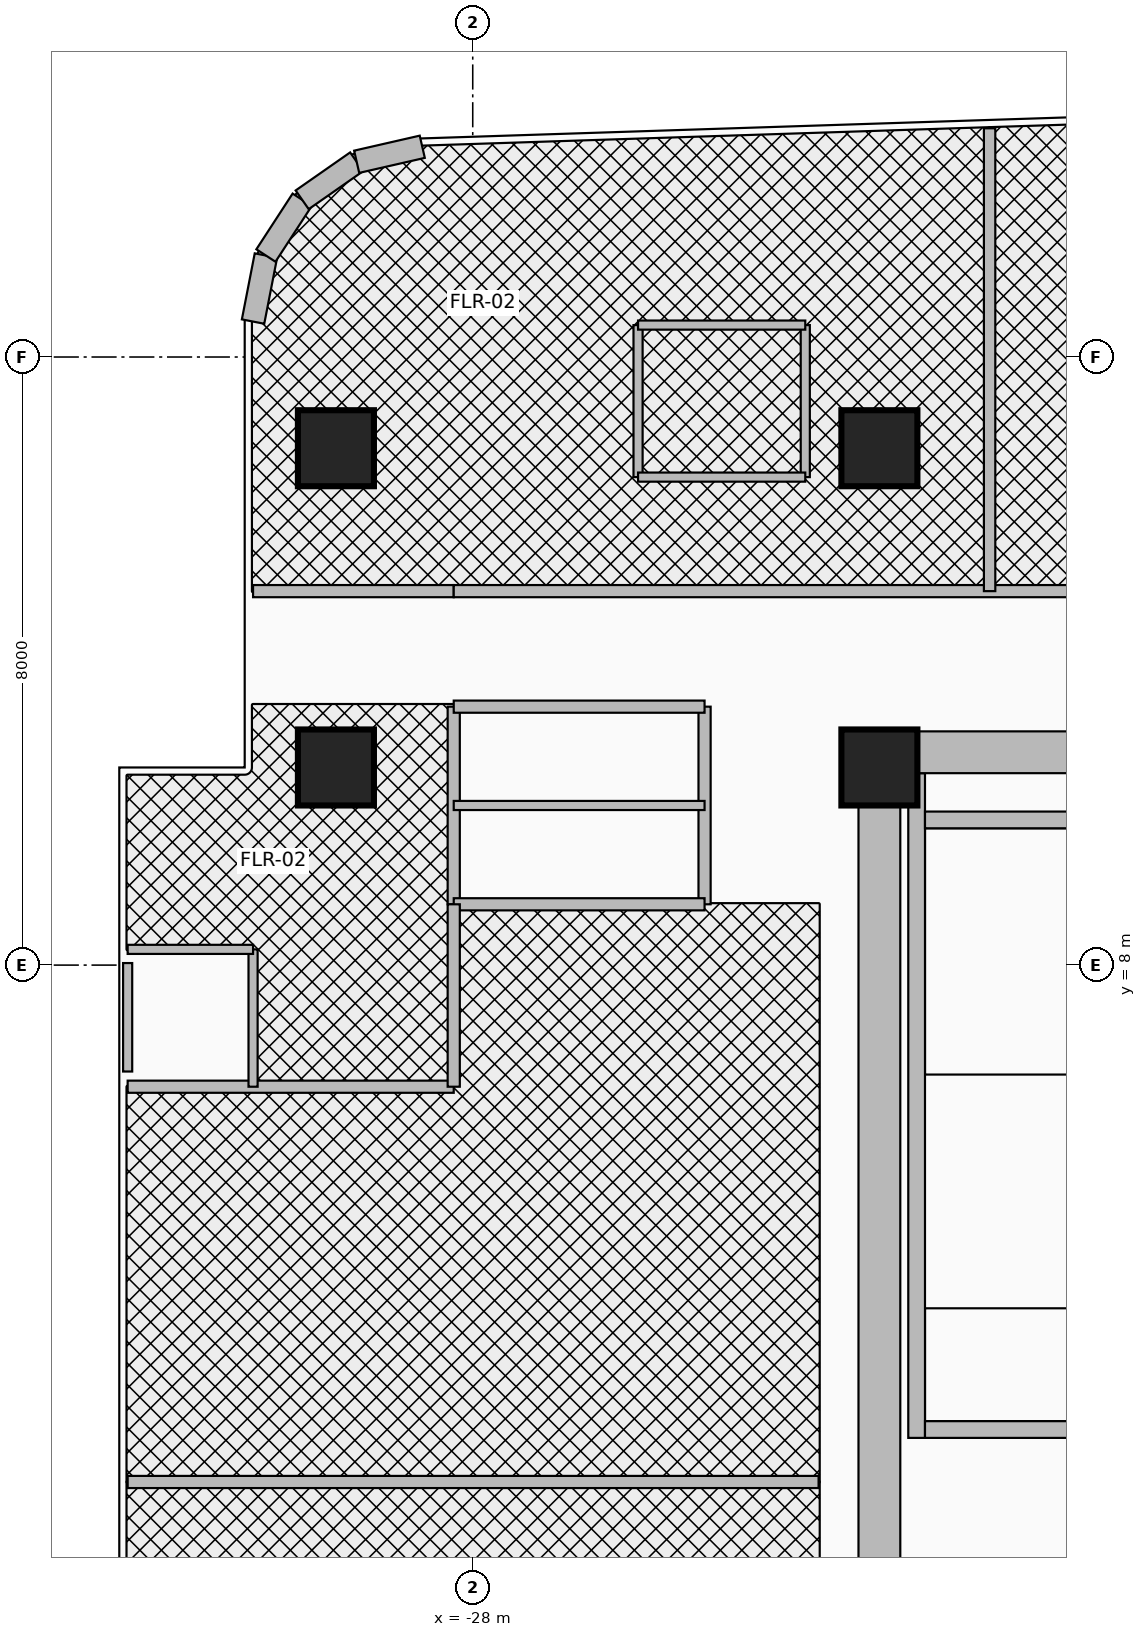
"""IFC4 building model, lengths in metres.
Left out: names, types, materials, properties, quantities, classifications, styles, units other than length and angle.
Written with IfcOpenShell. Run it as: python <this file> out.ifc"""

import sys

from ifc_helpers import new_model, si_unit, direction, frame, frame_2d, origin, origin_2d, place, context, subcontext, project, spatial, rectangle, extrude, source, transform, mapped, element, fill, save


model = new_model("IFC4")
c1 = context("Model", 3, precision=1e-05, world=origin(), true_north=direction((0.0, 1.0)))
c2 = subcontext(c1, "Body", "Model", "MODEL_VIEW")
j1 = project(units=[si_unit("LENGTHUNIT", "METRE"), si_unit("PLANEANGLEUNIT", "RADIAN")], contexts=[c1])
p1 = place(None, origin())
s1 = spatial("IfcSite", under=j1, at=p1, CompositionType="ELEMENT")
p2 = place(p1, origin())
s2 = spatial("IfcBuilding", under=s1, at=p2, CompositionType="ELEMENT")
p3 = place(p2, frame((0.0, 0.0, 172.3)))
s3 = spatial("IfcBuildingStorey", under=s2, at=p3, CompositionType="ELEMENT", Elevation=172.3)
p4 = place(p3, frame((-22.16, 1.78, 0.0), z_axis=(0.0, 0.0, 1.0), x_axis=(0.0, 1.0, 0.0)))
e1 = element("IfcWall", 1, at=p4, inside=s3, PredefinedType="SHEAR", context=c2, shape_type="SweptSolid", body=[
    extrude(rectangle(XDim=8.745, YDim=0.22, at=frame_2d((4.373, 0.0))), origin(), (0.0, 0.0, 1.0), 3.93),
])
p5 = place(p3, frame((-22.05, 1.89, 0.0), z_axis=(0.0, 0.0, 1.0), x_axis=(1.0, 0.0, 0.0)))
e2 = element("IfcWall", 2, at=p5, inside=s3, PredefinedType="SHEAR", context=c2, shape_type="SweptSolid", body=[
    extrude(rectangle(XDim=3.11, YDim=0.22, at=frame_2d((1.555, 0.0))), origin(), (0.0, 0.0, 1.0), 3.93),
])
p6 = place(p5, frame((1.0, 0.0, 0.0)))
e3 = element("IfcOpeningElement", 3, at=p6, cuts=e2, PredefinedType="OPENING", context=c2, shape_type="SweptSolid", body=[
    extrude(rectangle(XDim=1.1, YDim=2.15, at=frame_2d((0.55, 1.075))), frame((0.0, 0.125, 0.0), z_axis=(0.0, -1.0, 0.0), x_axis=(1.0, 0.0, 0.0)), (0.0, 0.0, 1.0), 0.25),
])
p7 = place(p3, frame((-22.05, 9.91, 0.0), z_axis=(0.0, 0.0, 1.0), x_axis=(1.0, 0.0, 0.0)))
e4 = element("IfcWall", 4, at=p7, inside=s3, PredefinedType="SHEAR", context=c2, shape_type="SweptSolid", body=[
    extrude(rectangle(XDim=3.11, YDim=0.22, at=frame_2d((1.555, 0.0))), origin(), (0.0, 0.0, 1.0), 3.93),
])
p8 = place(p3, frame((-22.65, -11.075, 0.0), z_axis=(0.0, 0.0, 1.0), x_axis=(0.0, 1.0, 0.0)))
e5 = element("IfcWall", 5, at=p8, inside=s3, PredefinedType="SHEAR", context=c2, shape_type="SweptSolid", body=[
    extrude(rectangle(XDim=22.15, YDim=0.55, at=frame_2d((11.075, 0.0))), origin(), (0.0, 0.0, 1.0), 3.93),
])
p9 = place(p3, frame((-22.65, 10.8, 0.0), z_axis=(0.0, 0.0, 1.0), x_axis=(1.0, 0.0, 0.0)))
e6 = element("IfcWall", 6, at=p9, inside=s3, PredefinedType="SHEAR", context=c2, shape_type="SweptSolid", body=[
    extrude(rectangle(XDim=10.25, YDim=0.55, at=frame_2d((5.125, 0.0))), origin(), (0.0, 0.0, 1.0), 3.93),
])
m1 = source(origin(), c2, "Body", "SweptSolid", [
    extrude(rectangle(XDim=1.0, YDim=1.0, at=origin_2d()), origin(), (0.0, 0.0, 1.0), 4.25),
])
for number, where, z_axis, x_axis in (
    (7, (-29.8, 10.6, 0.0), (0.0, 0.0, 1.0), (1.0, 0.0, 0.0)),
    (8, (-22.65, 10.6, 0.0), (0.0, 0.0, 1.0), (1.0, 0.0, 0.0)),
    (9, (-29.8, 14.8, 0.0), (0.0, 0.0, 1.0), (1.0, 0.0, 0.0)),
    (10, (-22.65, 14.8, 0.0), (0.0, 0.0, 1.0), (1.0, 0.0, 0.0)),
):
    element("IfcColumn", number, at=place(p3, frame(where, z_axis=z_axis, x_axis=x_axis)), inside=s3, PredefinedType="COLUMN", context=c2, shape_type="MappedRepresentation", body=[
        mapped(m1, transform((0.0, 0.0, 0.0), x_axis=(1.0, 0.0, 0.0), y_axis=(0.0, 1.0, 0.0), z_axis=(0.0, 0.0, 1.0), scale=1.0)),
    ])
p10 = place(p3, frame((-30.89, 16.466, 0.0), z_axis=(0.0, 0.0, 1.0), x_axis=(0.191128020887, 0.981565117367, 0.0)))
e11 = element("IfcWall", 11, at=p10, inside=s3, PredefinedType="SOLIDWALL", context=c2, shape_type="SweptSolid", body=[
    extrude(rectangle(XDim=0.885, YDim=0.3, at=frame_2d((0.443, 0.0))), origin(), (0.0, 0.0, 1.0), 3.93),
])
p11 = place(p3, frame((-30.721, 17.335, 0.0), z_axis=(0.0, 0.0, 1.0), x_axis=(0.545322000684, 0.838226649284, 0.0)))
e12 = element("IfcWall", 12, at=p11, inside=s3, PredefinedType="SOLIDWALL", context=c2, shape_type="SweptSolid", body=[
    extrude(rectangle(XDim=0.874, YDim=0.3, at=frame_2d((0.437, 0.0))), origin(), (0.0, 0.0, 1.0), 3.93),
])
p12 = place(p3, frame((-30.244, 18.068, 0.0), z_axis=(0.0, 0.0, 1.0), x_axis=(0.820005059444, 0.572356272339, 0.0)))
e13 = element("IfcWall", 13, at=p12, inside=s3, PredefinedType="SOLIDWALL", context=c2, shape_type="SweptSolid", body=[
    extrude(rectangle(XDim=0.875, YDim=0.3, at=frame_2d((0.437, 0.0))), origin(), (0.0, 0.0, 1.0), 3.93),
])
p13 = place(p3, frame((-29.527, 18.569, 0.0), z_axis=(0.0, 0.0, 1.0), x_axis=(0.974798570829, 0.223086858218, 0.0)))
e14 = element("IfcWall", 14, at=p13, inside=s3, PredefinedType="SOLIDWALL", context=c2, shape_type="SweptSolid", body=[
    extrude(rectangle(XDim=0.885, YDim=0.3, at=frame_2d((0.443, 0.0))), origin(), (0.0, 0.0, 1.0), 3.93),
])
p14 = place(p3, frame((-28.25, 8.8, 0.0), z_axis=(0.0, 0.0, 1.0), x_axis=(0.0, 1.0, 0.0)))
e15 = element("IfcWall", 15, at=p14, inside=s3, PredefinedType="PARTITIONING", context=c2, shape_type="SweptSolid", body=[
    extrude(rectangle(XDim=2.6, YDim=0.16, at=frame_2d((1.3, 0.0))), origin(), (0.0, 0.0, 1.0), 2.965),
])
p15 = place(p3, frame((-24.95, 8.8, 0.0), z_axis=(0.0, 0.0, 1.0), x_axis=(0.0, 1.0, 0.0)))
e16 = element("IfcWall", 16, at=p15, inside=s3, PredefinedType="PARTITIONING", context=c2, shape_type="SweptSolid", body=[
    extrude(rectangle(XDim=2.6, YDim=0.16, at=frame_2d((1.3, 0.0))), origin(), (0.0, 0.0, 1.0), 2.965),
])
p16 = place(p15, frame((0.3, 0.0, 0.0)))
e17 = element("IfcOpeningElement", 17, at=p16, cuts=e16, PredefinedType="OPENING", context=c2, shape_type="SweptSolid", body=[
    extrude(rectangle(XDim=0.85, YDim=2.1, at=frame_2d((0.425, 1.05))), frame((0.0, 0.095, 0.0), z_axis=(0.0, -1.0, 0.0), x_axis=(1.0, 0.0, 0.0)), (0.0, 0.0, 1.0), 0.19),
])
p17 = place(p15, frame((1.45, 0.0, 0.0)))
e18 = element("IfcOpeningElement", 18, at=p17, cuts=e16, PredefinedType="OPENING", context=c2, shape_type="SweptSolid", body=[
    extrude(rectangle(XDim=0.85, YDim=2.1, at=frame_2d((0.425, 1.05))), frame((0.0, 0.095, 0.0), z_axis=(0.0, -1.0, 0.0), x_axis=(1.0, 0.0, 0.0)), (0.0, 0.0, 1.0), 0.19),
])
for number, where, z_axis, x_axis in (
    (19, (-28.25, 8.8, 0.0), (0.0, 0.0, 1.0), (1.0, 0.0, 0.0)),
    (20, (-28.25, 11.4, 0.0), (0.0, 0.0, 1.0), (1.0, 0.0, 0.0)),
):
    element("IfcWall", number, at=place(p3, frame(where, z_axis=z_axis, x_axis=x_axis)), inside=s3, PredefinedType="PARTITIONING", context=c2, shape_type="SweptSolid", body=[
        extrude(rectangle(XDim=3.3, YDim=0.16, at=frame_2d((1.65, 0.0))), origin(), (0.0, 0.0, 1.0), 3.93),
    ])
p18 = place(p3, frame((-28.25, 10.1, 0.0), z_axis=(0.0, 0.0, 1.0), x_axis=(1.0, 0.0, 0.0)))
e21 = element("IfcWall", 21, at=p18, inside=s3, PredefinedType="PARTITIONING", context=c2, shape_type="SweptSolid", body=[
    extrude(rectangle(XDim=3.3, YDim=0.12, at=frame_2d((1.65, 0.0))), origin(), (0.0, 0.0, 1.0), 3.93),
])
p19 = place(p3, frame((-32.54, 6.4, 0.0), z_axis=(0.0, 0.0, 1.0), x_axis=(1.0, 0.0, 0.0)))
e22 = element("IfcWall", 22, at=p19, inside=s3, PredefinedType="PARTITIONING", context=c2, shape_type="SweptSolid", body=[
    extrude(rectangle(XDim=4.29, YDim=0.16, at=frame_2d((2.145, 0.0))), origin(), (0.0, 0.0, 1.0), 3.376),
])
p20 = place(p19, frame((2.495, 0.0, 0.0)))
e23 = element("IfcOpeningElement", 23, at=p20, cuts=e22, PredefinedType="OPENING", context=c2, shape_type="SweptSolid", body=[
    extrude(rectangle(XDim=0.95, YDim=2.15, at=frame_2d((0.475, 1.075))), frame((0.0, 0.095, 0.0), z_axis=(0.0, -1.0, 0.0), x_axis=(1.0, 0.0, 0.0)), (0.0, 0.0, 1.0), 0.19),
])
p21 = place(p3, frame((-28.25, 6.4, 0.0), z_axis=(0.0, 0.0, 1.0), x_axis=(0.0, 1.0, 0.0)))
e24 = element("IfcWall", 24, at=p21, inside=s3, PredefinedType="PARTITIONING", context=c2, shape_type="SweptSolid", body=[
    extrude(rectangle(XDim=2.4, YDim=0.16, at=frame_2d((1.2, 0.0))), origin(), (0.0, 0.0, 1.0), 3.458),
])
p22 = place(p3, frame((-30.89, 6.4, 0.0), z_axis=(0.0, 0.0, 1.0), x_axis=(0.0, 1.0, 0.0)))
e25 = element("IfcWall", 25, at=p22, inside=s3, PredefinedType="PARTITIONING", context=c2, shape_type="SweptSolid", body=[
    extrude(rectangle(XDim=1.807, YDim=0.12, at=frame_2d((0.904, 0.0))), origin(), (0.0, 0.0, 1.0), 3.93),
])
p23 = place(p3, frame((-32.54, 8.207, 0.0), z_axis=(0.0, 0.0, 1.0), x_axis=(1.0, 0.0, 0.0)))
e26 = element("IfcWall", 26, at=p23, inside=s3, PredefinedType="PARTITIONING", context=c2, shape_type="SweptSolid", body=[
    extrude(rectangle(XDim=1.65, YDim=0.12, at=frame_2d((0.825, 0.0))), origin(), (0.0, 0.0, 1.0), 3.93),
])
p24 = place(p23, frame((0.4, 0.0, 0.0)))
e27 = element("IfcOpeningElement", 27, at=p24, cuts=e26, PredefinedType="OPENING", context=c2, shape_type="SweptSolid", body=[
    extrude(rectangle(XDim=0.85, YDim=2.1, at=frame_2d((0.425, 1.05))), frame((0.0, 0.075, 0.0), z_axis=(0.0, -1.0, 0.0), x_axis=(1.0, 0.0, 0.0)), (0.0, 0.0, 1.0), 0.15),
])
p25 = place(p3, frame((-32.54, 6.6, 0.0), z_axis=(0.0, 0.0, 1.0), x_axis=(0.0, 1.0, 0.0)))
e28 = element("IfcWall", 28, at=p25, inside=s3, PredefinedType="PARTITIONING", context=c2, shape_type="SweptSolid", body=[
    extrude(rectangle(XDim=1.427, YDim=0.12, at=frame_2d((0.713, 0.0))), origin(), (0.0, 0.0, 1.0), 3.564),
])
p26 = place(p3, frame((-32.54, 1.2, 0.0), z_axis=(0.0, 0.0, 1.0), x_axis=(1.0, 0.0, 0.0)))
e29 = element("IfcWall", 29, at=p26, inside=s3, PredefinedType="PARTITIONING", context=c2, shape_type="SweptSolid", body=[
    extrude(rectangle(XDim=9.09, YDim=0.16, at=frame_2d((4.545, 0.0))), origin(), (0.0, 0.0, 1.0), 3.376),
])
p27 = place(p26, frame((3.2, 0.0, 0.0)))
e30 = element("IfcOpeningElement", 30, at=p27, cuts=e29, PredefinedType="OPENING", context=c2, shape_type="SweptSolid", body=[
    extrude(rectangle(XDim=1.8, YDim=2.15, at=frame_2d((0.9, 1.075))), frame((0.0, 0.095, 0.0), z_axis=(0.0, -1.0, 0.0), x_axis=(1.0, 0.0, 0.0)), (0.0, 0.0, 1.0), 0.19),
])
p28 = place(p3, frame((-30.89, 12.92, 0.0), z_axis=(0.0, 0.0, 1.0), x_axis=(1.0, 0.0, 0.0)))
e31 = element("IfcWall", 31, at=p28, inside=s3, PredefinedType="PARTITIONING", context=c2, shape_type="SweptSolid", body=[
    extrude(rectangle(XDim=2.64, YDim=0.16, at=frame_2d((1.32, 0.0))), origin(), (0.0, 0.0, 1.0), 3.376),
])
p29 = place(p3, frame((-28.25, 12.92, 0.0), z_axis=(0.0, 0.0, 1.0), x_axis=(1.0, 0.0, 0.0)))
e32 = element("IfcWall", 32, at=p29, inside=s3, PredefinedType="PARTITIONING", context=c2, shape_type="SweptSolid", body=[
    extrude(rectangle(XDim=36.75, YDim=0.16, at=frame_2d((18.375, 0.0))), origin(), (0.0, 0.0, 1.0), 2.915),
])
p30 = place(p29, frame((3.05, 0.0, 0.0)))
e33 = element("IfcOpeningElement", 33, at=p30, cuts=e32, PredefinedType="OPENING", context=c2, shape_type="SweptSolid", body=[
    extrude(rectangle(XDim=0.95, YDim=2.15, at=frame_2d((0.475, 1.075))), frame((0.0, 0.095, 0.0), z_axis=(0.0, -1.0, 0.0), x_axis=(1.0, 0.0, 0.0)), (0.0, 0.0, 1.0), 0.19),
])
p31 = place(p29, frame((10.575, 0.0, 0.0)))
e34 = element("IfcOpeningElement", 34, at=p31, cuts=e32, PredefinedType="OPENING", context=c2, shape_type="SweptSolid", body=[
    extrude(rectangle(XDim=0.95, YDim=2.15, at=frame_2d((0.475, 1.075))), frame((0.0, 0.095, 0.0), z_axis=(0.0, -1.0, 0.0), x_axis=(1.0, 0.0, 0.0)), (0.0, 0.0, 1.0), 0.19),
])
p32 = place(p29, frame((19.15, 0.0, 0.0)))
e35 = element("IfcOpeningElement", 35, at=p32, cuts=e32, PredefinedType="OPENING", context=c2, shape_type="SweptSolid", body=[
    extrude(rectangle(XDim=0.95, YDim=2.15, at=frame_2d((0.475, 1.075))), frame((0.0, 0.095, 0.0), z_axis=(0.0, -1.0, 0.0), x_axis=(1.0, 0.0, 0.0)), (0.0, 0.0, 1.0), 0.19),
])
p33 = place(p29, frame((27.55, 0.0, 0.0)))
e36 = element("IfcOpeningElement", 36, at=p33, cuts=e32, PredefinedType="OPENING", context=c2, shape_type="SweptSolid", body=[
    extrude(rectangle(XDim=0.95, YDim=2.15, at=frame_2d((0.475, 1.075))), frame((0.0, 0.095, 0.0), z_axis=(0.0, -1.0, 0.0), x_axis=(1.0, 0.0, 0.0)), (0.0, 0.0, 1.0), 0.19),
])
p34 = place(p29, frame((33.981, 0.0, 0.0)))
e37 = element("IfcOpeningElement", 37, at=p34, cuts=e32, PredefinedType="OPENING", context=c2, shape_type="SweptSolid", body=[
    extrude(rectangle(XDim=0.95, YDim=2.15, at=frame_2d((0.475, 1.075))), frame((0.0, 0.095, 0.0), z_axis=(0.0, -1.0, 0.0), x_axis=(1.0, 0.0, 0.0)), (0.0, 0.0, 1.0), 0.19),
])
p35 = place(p3, frame((-21.2, 12.92, 0.0), z_axis=(0.0, 0.0, 1.0), x_axis=(0.0, 1.0, 0.0)))
e38 = element("IfcWall", 38, at=p35, inside=s3, PredefinedType="PARTITIONING", context=c2, shape_type="SweptSolid", body=[
    extrude(rectangle(XDim=6.089, YDim=0.15, at=frame_2d((3.044, 0.0))), origin(), (0.0, 0.0, 1.0), 2.965),
])
for number, where, z_axis, x_axis in (
    (39, (-25.825, 14.42, 0.0), (0.0, 0.0, 1.0), (0.0, 1.0, 0.0)),
    (40, (-23.625, 14.42, 0.0), (0.0, 0.0, 1.0), (0.0, 1.0, 0.0)),
):
    element("IfcWall", number, at=place(p3, frame(where, z_axis=z_axis, x_axis=x_axis)), inside=s3, PredefinedType="PARTITIONING", context=c2, shape_type="SweptSolid", body=[
        extrude(rectangle(XDim=2.0, YDim=0.12, at=frame_2d((1.0, 0.0))), origin(), (0.0, 0.0, 1.0), 2.965),
    ])
p36 = place(p3, frame((-25.825, 16.42, 0.0), z_axis=(0.0, 0.0, 1.0), x_axis=(1.0, 0.0, 0.0)))
e41 = element("IfcWall", 41, at=p36, inside=s3, PredefinedType="PARTITIONING", context=c2, shape_type="SweptSolid", body=[
    extrude(rectangle(XDim=2.2, YDim=0.12, at=frame_2d((1.1, 0.0))), origin(), (0.0, 0.0, 1.0), 3.93),
])
p37 = place(p3, frame((-25.825, 14.42, 0.0), z_axis=(0.0, 0.0, 1.0), x_axis=(1.0, 0.0, 0.0)))
e42 = element("IfcWall", 42, at=p37, inside=s3, PredefinedType="PARTITIONING", context=c2, shape_type="SweptSolid", body=[
    extrude(rectangle(XDim=2.2, YDim=0.12, at=frame_2d((1.1, 0.0))), origin(), (0.0, 0.0, 1.0), 3.93),
])
p38 = place(p37, frame((0.675, 0.0, 0.0)))
e43 = element("IfcOpeningElement", 43, at=p38, cuts=e42, PredefinedType="OPENING", context=c2, shape_type="SweptSolid", body=[
    extrude(rectangle(XDim=0.85, YDim=2.1, at=frame_2d((0.425, 1.05))), frame((0.0, 0.075, 0.0), z_axis=(0.0, -1.0, 0.0), x_axis=(1.0, 0.0, 0.0)), (0.0, 0.0, 1.0), 0.15),
])
p39 = place(p6, frame((1.1, 0.0, 0.0), z_axis=(0.0, 0.0, 1.0), x_axis=(-1.0, 0.0, 0.0)))
e44 = element("IfcDoor", 44, at=p39, inside=s3, OperationType="SINGLE_SWING_LEFT", PredefinedType="DOOR", context=c2, shape_type="SweptSolid", body=[
    extrude(rectangle(XDim=1.1, YDim=2.15, at=frame_2d((0.55, 1.075))), frame((0.0, 0.025, 0.0), z_axis=(0.0, -1.0, 0.0), x_axis=(1.0, 0.0, 0.0)), (0.0, 0.0, 1.0), 0.05),
])
fill(e3, e44)
p40 = place(p16, origin())
e45 = element("IfcDoor", 45, at=p40, inside=s3, OperationType="SINGLE_SWING_RIGHT", PredefinedType="DOOR", context=c2, shape_type="SweptSolid", body=[
    extrude(rectangle(XDim=0.85, YDim=2.1, at=frame_2d((0.425, 1.05))), frame((0.0, 0.025, 0.0), z_axis=(0.0, -1.0, 0.0), x_axis=(1.0, 0.0, 0.0)), (0.0, 0.0, 1.0), 0.05),
])
fill(e17, e45)
p41 = place(p17, origin())
e46 = element("IfcDoor", 46, at=p41, inside=s3, OperationType="SINGLE_SWING_LEFT", PredefinedType="DOOR", context=c2, shape_type="SweptSolid", body=[
    extrude(rectangle(XDim=0.85, YDim=2.1, at=frame_2d((0.425, 1.05))), frame((0.0, 0.025, 0.0), z_axis=(0.0, -1.0, 0.0), x_axis=(1.0, 0.0, 0.0)), (0.0, 0.0, 1.0), 0.05),
])
fill(e18, e46)
p42 = place(p20, origin())
e47 = element("IfcDoor", 47, at=p42, inside=s3, OperationType="SINGLE_SWING_RIGHT", PredefinedType="DOOR", context=c2, shape_type="SweptSolid", body=[
    extrude(rectangle(XDim=0.95, YDim=2.15, at=frame_2d((0.475, 1.075))), frame((0.0, 0.025, 0.0), z_axis=(0.0, -1.0, 0.0), x_axis=(1.0, 0.0, 0.0)), (0.0, 0.0, 1.0), 0.05),
])
fill(e23, e47)
p43 = place(p24, origin())
e48 = element("IfcDoor", 48, at=p43, inside=s3, OperationType="SINGLE_SWING_LEFT", PredefinedType="DOOR", context=c2, shape_type="SweptSolid", body=[
    extrude(rectangle(XDim=0.85, YDim=2.1, at=frame_2d((0.425, 1.05))), frame((0.0, 0.025, 0.0), z_axis=(0.0, -1.0, 0.0), x_axis=(1.0, 0.0, 0.0)), (0.0, 0.0, 1.0), 0.05),
])
fill(e27, e48)
p44 = place(p27, origin())
e49 = element("IfcDoor", 49, at=p44, inside=s3, OperationType="DOUBLE_DOOR_SINGLE_SWING", PredefinedType="DOOR", context=c2, shape_type="SweptSolid", body=[
    extrude(rectangle(XDim=1.8, YDim=2.15, at=frame_2d((0.9, 1.075))), frame((0.0, 0.025, 0.0), z_axis=(0.0, -1.0, 0.0), x_axis=(1.0, 0.0, 0.0)), (0.0, 0.0, 1.0), 0.05),
])
fill(e30, e49)
p45 = place(p30, origin())
e50 = element("IfcDoor", 50, at=p45, inside=s3, OperationType="SINGLE_SWING_RIGHT", PredefinedType="DOOR", context=c2, shape_type="SweptSolid", body=[
    extrude(rectangle(XDim=0.95, YDim=2.15, at=frame_2d((0.475, 1.075))), frame((0.0, 0.025, 0.0), z_axis=(0.0, -1.0, 0.0), x_axis=(1.0, 0.0, 0.0)), (0.0, 0.0, 1.0), 0.05),
])
fill(e33, e50)
p46 = place(p38, origin())
e51 = element("IfcDoor", 51, at=p46, inside=s3, OperationType="SINGLE_SWING_LEFT", PredefinedType="DOOR", context=c2, shape_type="SweptSolid", body=[
    extrude(rectangle(XDim=0.85, YDim=2.1, at=frame_2d((0.425, 1.05))), frame((0.0, 0.025, 0.0), z_axis=(0.0, -1.0, 0.0), x_axis=(1.0, 0.0, 0.0)), (0.0, 0.0, 1.0), 0.05),
])
fill(e43, e51)
save(model, sys.argv[1])
